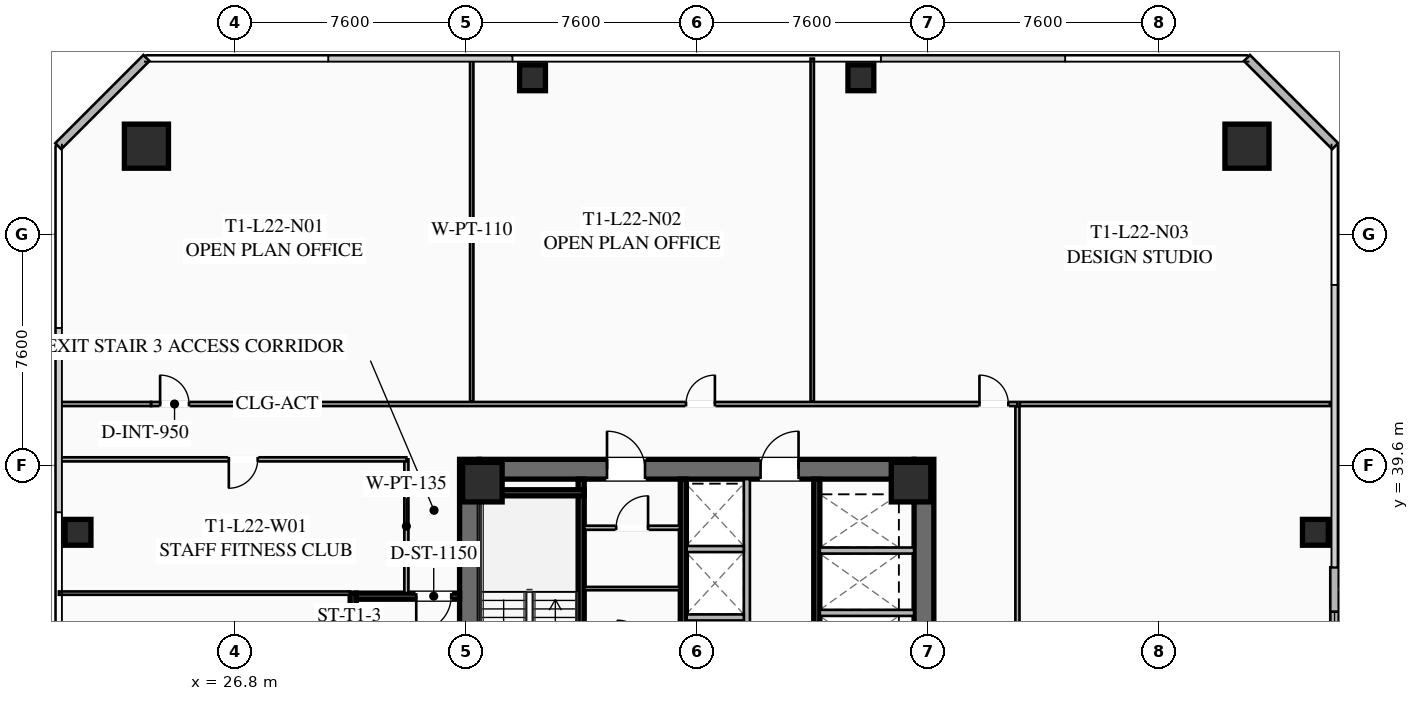
"""IFC4 building model, lengths in metres.
Left out: names, types, materials, properties, quantities, classifications, styles, units other than length and angle.
Written with IfcOpenShell. Run it as: python <this file> out.ifc"""

import sys

from ifc_helpers import new_model, si_unit, direction, frame, frame_2d, origin, origin_2d, place, context, subcontext, project, spatial, rectangle, hollow_rectangle, extrude, element, fill, save


model = new_model("IFC4")
c1 = context("Model", 3, precision=1e-05, world=origin(), true_north=direction((0.0, 1.0)))
c2 = subcontext(c1, "Body", "Model", "MODEL_VIEW")
j1 = project(units=[si_unit("LENGTHUNIT", "METRE"), si_unit("PLANEANGLEUNIT", "RADIAN")], contexts=[c1])
p1 = place(None, origin())
s1 = spatial("IfcSite", under=j1, at=p1, CompositionType="ELEMENT")
p2 = place(p1, origin())
s2 = spatial("IfcBuilding", under=s1, at=p2, CompositionType="ELEMENT")
p3 = place(p2, frame((0.0, 0.0, 84.95)))
s3 = spatial("IfcBuildingStorey", under=s2, at=p3, CompositionType="ELEMENT", Elevation=84.95)
for number, where, z_axis, x_axis in (
    (1, (34.525, 24.2, 0.0), (0.0, 0.0, 1.0), (0.0, 1.0, 0.0)),
    (2, (49.475, 39.8, 0.0), (0.0, 0.0, 1.0), (0.0, -1.0, 0.0)),
):
    element("IfcWall", number, at=place(p3, frame(where, z_axis=z_axis, x_axis=x_axis)), inside=s3, PredefinedType="SHEAR", context=c2, shape_type="SweptSolid", body=[
        extrude(rectangle(XDim=15.6, YDim=0.65, at=frame_2d((7.8, 0.0))), origin(), (0.0, 0.0, 1.0), 3.55),
    ])
p4 = place(p3, frame((34.85, 39.475, 0.0), z_axis=(0.0, 0.0, 1.0), x_axis=(1.0, 0.0, 0.0)))
e3 = element("IfcWall", 3, at=p4, inside=s3, PredefinedType="SHEAR", context=c2, shape_type="SweptSolid", body=[
    extrude(rectangle(XDim=14.3, YDim=0.65, at=frame_2d((7.15, 0.0))), origin(), (0.0, 0.0, 1.0), 3.55),
])
p5 = place(p4, frame((4.2, 0.0, 0.0)))
e4 = element("IfcOpeningElement", 4, at=p5, cuts=e3, PredefinedType="OPENING", context=c2, shape_type="SweptSolid", body=[
    extrude(rectangle(XDim=1.25, YDim=2.25, at=frame_2d((0.625, 1.125))), frame((0.0, 0.335, 0.0), z_axis=(0.0, -1.0, 0.0), x_axis=(1.0, 0.0, 0.0)), (0.0, 0.0, 1.0), 0.67),
])
p6 = place(p4, frame((9.25, 0.0, 0.0)))
e5 = element("IfcOpeningElement", 5, at=p6, cuts=e3, PredefinedType="OPENING", context=c2, shape_type="SweptSolid", body=[
    extrude(rectangle(XDim=1.25, YDim=2.25, at=frame_2d((0.625, 1.125))), frame((0.0, 0.335, 0.0), z_axis=(0.0, -1.0, 0.0), x_axis=(1.0, 0.0, 0.0)), (0.0, 0.0, 1.0), 0.67),
])
for number, where, z_axis, x_axis in (
    (6, (49.05, 39.05, 0.0), (0.0, 0.0, 1.0), (1.0, 0.0, 0.0)),
    (7, (34.95, 39.05, 0.0), (0.0, 0.0, 1.0), (1.0, 0.0, 0.0)),
):
    element("IfcColumn", number, at=place(p3, frame(where, z_axis=z_axis, x_axis=x_axis)), inside=s3, PredefinedType="COLUMN", context=c2, shape_type="SweptSolid", body=[
        extrude(hollow_rectangle(XDim=1.3, YDim=1.3, WallThickness=0.05, at=origin_2d()), origin(), (0.0, 0.0, 1.0), 3.35),
    ])
for number, where, z_axis, x_axis in (
    (8, (60.1, 50.1, 0.0), (0.0, 0.0, 1.0), (1.0, 0.0, 0.0)),
    (9, (23.9, 50.1, 0.0), (0.0, 0.0, 1.0), (1.0, 0.0, 0.0)),
):
    element("IfcColumn", number, at=place(p3, frame(where, z_axis=z_axis, x_axis=x_axis)), inside=s3, PredefinedType="COLUMN", context=c2, shape_type="SweptSolid", body=[
        extrude(hollow_rectangle(XDim=1.45, YDim=1.45, WallThickness=0.055, at=origin_2d()), origin(), (0.0, 0.0, 1.0), 3.35),
    ])
for number, where, z_axis, x_axis in (
    (10, (62.35, 37.4, 0.0), (0.0, 0.0, 1.0), (1.0, 0.0, 0.0)),
    (11, (47.4, 52.35, 0.0), (0.0, 0.0, 1.0), (1.0, 0.0, 0.0)),
    (12, (36.6, 52.35, 0.0), (0.0, 0.0, 1.0), (1.0, 0.0, 0.0)),
    (13, (21.65, 37.4, 0.0), (0.0, 0.0, 1.0), (1.0, 0.0, 0.0)),
):
    element("IfcColumn", number, at=place(p3, frame(where, z_axis=z_axis, x_axis=x_axis)), inside=s3, PredefinedType="COLUMN", context=c2, shape_type="SweptSolid", body=[
        extrude(hollow_rectangle(XDim=0.85, YDim=0.85, WallThickness=0.035, at=origin_2d()), origin(), (0.0, 0.0, 1.0), 3.35),
    ])
p7 = place(p3, frame((62.98, 36.25, 0.0), z_axis=(0.0, 0.0, 1.0), x_axis=(0.0, -1.0, 0.0)))
e14 = element("IfcWall", 14, at=p7, inside=s3, PredefinedType="SOLIDWALL", context=c2, shape_type="SweptSolid", body=[
    extrude(rectangle(XDim=8.5, YDim=0.28, at=frame_2d((4.25, 0.0))), origin(), (0.0, 0.0, 1.0), 3.35),
])
p8 = place(p7, frame((3.6, 0.0, 0.0)))
e15 = element("IfcOpeningElement", 15, at=p8, cuts=e14, PredefinedType="OPENING", context=c2, shape_type="SweptSolid", body=[
    extrude(rectangle(XDim=1.3, YDim=2.15, at=frame_2d((0.65, 1.075))), frame((0.0, 0.15, 0.0), z_axis=(0.0, -1.0, 0.0), x_axis=(1.0, 0.0, 0.0)), (0.0, 0.0, 1.0), 0.3),
])
p9 = place(p7, frame((1.46, 0.0, 0.85)))
e16 = element("IfcOpeningElement", 16, at=p9, cuts=e14, PredefinedType="OPENING", context=c2, shape_type="SweptSolid", body=[
    extrude(rectangle(XDim=1.8, YDim=1.92, at=frame_2d((0.9, 0.96))), frame((0.0, 0.15, 0.0), z_axis=(0.0, -1.0, 0.0), x_axis=(1.0, 0.0, 0.0)), (0.0, 0.0, 1.0), 0.3),
])
for number, where, z_axis, x_axis in (
    (17, (21.0, 50.1, 0.0), (0.0, 0.0, 1.0), (0.707, 0.707, 0.0)),
    (18, (60.1, 53.0, 0.0), (0.0, 0.0, 1.0), (0.707, -0.707, 0.0)),
):
    element("IfcWall", number, at=place(p3, frame(where, z_axis=z_axis, x_axis=x_axis)), inside=s3, PredefinedType="SOLIDWALL", context=c2, shape_type="SweptSolid", body=[
        extrude(rectangle(XDim=4.101, YDim=0.28, at=frame_2d((2.051, 0.0))), origin(), (0.0, 0.0, 1.0), 3.35),
    ])
p10 = place(p3, frame((38.2, 31.2, 0.0), z_axis=(0.0, 0.0, 1.0), x_axis=(0.0, 1.0, 0.0)))
e19 = element("IfcWall", 19, at=p10, inside=s3, PredefinedType="SHEAR", context=c2, shape_type="SweptSolid", body=[
    extrude(rectangle(XDim=7.95, YDim=0.2, at=frame_2d((3.975, 0.0))), origin(), (0.0, 0.0, 1.0), 3.35),
])
p11 = place(p10, frame((0.45, 0.0, 0.0)))
e20 = element("IfcOpeningElement", 20, at=p11, cuts=e19, PredefinedType="OPENING", context=c2, shape_type="SweptSolid", body=[
    extrude(rectangle(XDim=1.15, YDim=2.2, at=frame_2d((0.575, 1.1))), frame((0.0, 0.11, 0.0), z_axis=(0.0, -1.0, 0.0), x_axis=(1.0, 0.0, 0.0)), (0.0, 0.0, 1.0), 0.22),
])
p12 = place(p3, frame((34.85, 38.7, 0.0), z_axis=(0.0, 0.0, 1.0), x_axis=(1.0, 0.0, 0.0)))
e21 = element("IfcWall", 21, at=p12, inside=s3, PredefinedType="SHEAR", context=c2, shape_type="SweptSolid", body=[
    extrude(rectangle(XDim=3.45, YDim=0.2, at=frame_2d((1.725, 0.0))), origin(), (0.0, 0.0, 1.0), 3.35),
])
p13 = place(p3, frame((41.56, 24.85, 0.0), z_axis=(0.0, 0.0, 1.0), x_axis=(0.0, 1.0, 0.0)))
e22 = element("IfcWall", 22, at=p13, inside=s3, PredefinedType="SHEAR", context=c2, shape_type="SweptSolid", body=[
    extrude(rectangle(XDim=14.3, YDim=0.2, at=frame_2d((7.15, 0.0))), origin(), (0.0, 0.0, 1.0), 3.35),
])
p14 = place(p3, frame((45.95, 39.15, 0.0), z_axis=(0.0, 0.0, 1.0), x_axis=(0.0, -1.0, 0.0)))
e23 = element("IfcWall", 23, at=p14, inside=s3, PredefinedType="SHEAR", context=c2, shape_type="SweptSolid", body=[
    extrude(rectangle(XDim=6.35, YDim=0.2, at=frame_2d((3.175, 0.0))), origin(), (0.0, 0.0, 1.0), 3.35),
])
for number, where, z_axis, x_axis in (
    (24, (46.05, 34.75, 0.0), (0.0, 0.0, 1.0), (1.0, 0.0, 0.0)),
    (25, (46.05, 36.8, 0.0), (0.0, 0.0, 1.0), (1.0, 0.0, 0.0)),
):
    element("IfcWall", number, at=place(p3, frame(where, z_axis=z_axis, x_axis=x_axis)), inside=s3, PredefinedType="SOLIDWALL", context=c2, shape_type="SweptSolid", body=[
        extrude(rectangle(XDim=3.1, YDim=0.2, at=frame_2d((1.55, 0.0))), origin(), (0.0, 0.0, 1.0), 3.35),
    ])
p15 = place(p3, frame((38.3, 37.55, 0.0), z_axis=(0.0, 0.0, 1.0), x_axis=(1.0, 0.0, 0.0)))
e26 = element("IfcWall", 26, at=p15, inside=s3, PredefinedType="PARTITIONING", context=c2, shape_type="SweptSolid", body=[
    extrude(rectangle(XDim=3.15, YDim=0.135, at=frame_2d((1.575, 0.0))), origin(), (0.0, 0.0, 1.0), 2.703),
])
p16 = place(p15, frame((1.05, 0.0, 0.0)))
e27 = element("IfcOpeningElement", 27, at=p16, cuts=e26, PredefinedType="OPENING", context=c2, shape_type="SweptSolid", body=[
    extrude(rectangle(XDim=1.05, YDim=2.2, at=frame_2d((0.525, 1.1))), frame((0.0, 0.077, 0.0), z_axis=(0.0, -1.0, 0.0), x_axis=(1.0, 0.0, 0.0)), (0.0, 0.0, 1.0), 0.155),
])
p17 = place(p3, frame((38.3, 35.55, 0.0), z_axis=(0.0, 0.0, 1.0), x_axis=(1.0, 0.0, 0.0)))
e28 = element("IfcWall", 28, at=p17, inside=s3, PredefinedType="PARTITIONING", context=c2, shape_type="SweptSolid", body=[
    extrude(rectangle(XDim=3.15, YDim=0.11, at=frame_2d((1.575, 0.0))), origin(), (0.0, 0.0, 1.0), 2.703),
])
p18 = place(p3, frame((43.65, 32.35, 0.0), z_axis=(0.0, 0.0, 1.0), x_axis=(0.0, 1.0, 0.0)))
e29 = element("IfcWall", 29, at=p18, inside=s3, PredefinedType="SOLIDWALL", context=c2, shape_type="SweptSolid", body=[
    extrude(rectangle(XDim=6.8, YDim=0.2, at=frame_2d((3.4, 0.0))), origin(), (0.0, 0.0, 1.0), 3.35),
])
for number, where, z_axis, x_axis in (
    (30, (41.67, 34.6, 0.0), (0.0, 0.0, 1.0), (1.0, 0.0, 0.0)),
    (31, (41.67, 36.85, 0.0), (0.0, 0.0, 1.0), (1.0, 0.0, 0.0)),
):
    element("IfcWall", number, at=place(p3, frame(where, z_axis=z_axis, x_axis=x_axis)), inside=s3, PredefinedType="SOLIDWALL", context=c2, shape_type="SweptSolid", body=[
        extrude(rectangle(XDim=1.88, YDim=0.2, at=frame_2d((0.94, 0.0))), origin(), (0.0, 0.0, 1.0), 3.35),
    ])
p19 = place(p3, frame((30.7, 28.6, 0.0), z_axis=(0.0, 0.0, 1.0), x_axis=(0.0, 1.0, 0.0)))
e32 = element("IfcWall", 32, at=p19, inside=s3, PredefinedType="SHEAR", context=c2, shape_type="SweptSolid", body=[
    extrude(rectangle(XDim=6.8, YDim=0.2, at=frame_2d((3.4, 0.0))), origin(), (0.0, 0.0, 1.0), 3.35),
])
p20 = place(p3, frame((34.2, 35.3, 0.0), z_axis=(0.0, 0.0, 1.0), x_axis=(-1.0, 0.0, 0.0)))
e33 = element("IfcWall", 33, at=p20, inside=s3, PredefinedType="SHEAR", context=c2, shape_type="SweptSolid", body=[
    extrude(rectangle(XDim=3.4, YDim=0.2, at=frame_2d((1.7, 0.0))), origin(), (0.0, 0.0, 1.0), 3.35),
])
p21 = place(p20, frame((0.275, 0.0, 0.0)))
e34 = element("IfcOpeningElement", 34, at=p21, cuts=e33, PredefinedType="OPENING", context=c2, shape_type="SweptSolid", body=[
    extrude(rectangle(XDim=1.15, YDim=2.2, at=frame_2d((0.575, 1.1))), frame((0.0, 0.11, 0.0), z_axis=(0.0, -1.0, 0.0), x_axis=(1.0, 0.0, 0.0)), (0.0, 0.0, 1.0), 0.22),
])
p22 = place(p3, frame((32.45, 35.4, 0.0), z_axis=(0.0, 0.0, 1.0), x_axis=(0.0, 1.0, 0.0)))
e35 = element("IfcWall", 35, at=p22, inside=s3, PredefinedType="PARTITIONING", context=c2, shape_type="SweptSolid", body=[
    extrude(rectangle(XDim=4.4, YDim=0.135, at=frame_2d((2.2, 0.0))), origin(), (0.0, 0.0, 1.0), 2.703),
])
p23 = place(p3, frame((24.05, 41.62, 0.0), z_axis=(0.0, 0.0, 1.0), x_axis=(1.0, 0.0, 0.0)))
e36 = element("IfcWall", 36, at=p23, inside=s3, PredefinedType="PARTITIONING", context=c2, shape_type="SweptSolid", body=[
    extrude(rectangle(XDim=28.5, YDim=0.135, at=frame_2d((14.25, 0.0))), origin(), (0.0, 0.0, 1.0), 2.703),
])
p24 = place(p23, frame((0.3, 0.0, 0.0)))
e37 = element("IfcOpeningElement", 37, at=p24, cuts=e36, PredefinedType="OPENING", context=c2, shape_type="SweptSolid", body=[
    extrude(rectangle(XDim=0.95, YDim=2.05, at=frame_2d((0.475, 1.025))), frame((0.0, 0.077, 0.0), z_axis=(0.0, -1.0, 0.0), x_axis=(1.0, 0.0, 0.0)), (0.0, 0.0, 1.0), 0.155),
])
p25 = place(p23, frame((17.599, 0.0, 0.0)))
e38 = element("IfcOpeningElement", 38, at=p25, cuts=e36, PredefinedType="OPENING", context=c2, shape_type="SweptSolid", body=[
    extrude(rectangle(XDim=0.95, YDim=2.05, at=frame_2d((0.475, 1.025))), frame((0.0, 0.077, 0.0), z_axis=(0.0, -1.0, 0.0), x_axis=(1.0, 0.0, 0.0)), (0.0, 0.0, 1.0), 0.155),
])
p26 = place(p23, frame((27.25, 0.0, 0.0)))
e39 = element("IfcOpeningElement", 39, at=p26, cuts=e36, PredefinedType="OPENING", context=c2, shape_type="SweptSolid", body=[
    extrude(rectangle(XDim=0.95, YDim=2.05, at=frame_2d((0.475, 1.025))), frame((0.0, 0.077, 0.0), z_axis=(0.0, -1.0, 0.0), x_axis=(1.0, 0.0, 0.0)), (0.0, 0.0, 1.0), 0.155),
])
p27 = place(p3, frame((21.02, 41.62, 0.0), z_axis=(0.0, 0.0, 1.0), x_axis=(1.0, 0.0, 0.0)))
e40 = element("IfcWall", 40, at=p27, inside=s3, PredefinedType="PARTITIONING", context=c2, shape_type="SweptSolid", body=[
    extrude(rectangle(XDim=3.03, YDim=0.135, at=frame_2d((1.515, 0.0))), origin(), (0.0, 0.0, 1.0), 2.703),
])
for number, where, z_axis, x_axis in (
    (41, (34.6, 41.7, 0.0), (0.0, 0.0, 1.0), (0.0, 1.0, 0.0)),
    (42, (45.8, 41.7, 0.0), (0.0, 0.0, 1.0), (0.0, 1.0, 0.0)),
):
    element("IfcWall", number, at=place(p3, frame(where, z_axis=z_axis, x_axis=x_axis)), inside=s3, PredefinedType="PARTITIONING", context=c2, shape_type="SweptSolid", body=[
        extrude(rectangle(XDim=11.28, YDim=0.11, at=frame_2d((5.64, 0.0))), origin(), (0.0, 0.0, 1.0), 2.703),
    ])
p28 = place(p3, frame((52.55, 41.54, 0.0), z_axis=(0.0, 0.0, 1.0), x_axis=(0.0, -1.0, 0.0)))
e43 = element("IfcWall", 43, at=p28, inside=s3, PredefinedType="PARTITIONING", context=c2, shape_type="SweptSolid", body=[
    extrude(rectangle(XDim=20.71, YDim=0.135, at=frame_2d((10.355, 0.0))), origin(), (0.0, 0.0, 1.0), 2.703),
])
p29 = place(p28, frame((19.46, 0.0, 0.0)))
e44 = element("IfcOpeningElement", 44, at=p29, cuts=e43, PredefinedType="OPENING", context=c2, shape_type="SweptSolid", body=[
    extrude(rectangle(XDim=0.95, YDim=2.05, at=frame_2d((0.475, 1.025))), frame((0.0, 0.077, 0.0), z_axis=(0.0, -1.0, 0.0), x_axis=(1.0, 0.0, 0.0)), (0.0, 0.0, 1.0), 0.155),
])
p30 = place(p3, frame((62.83, 41.62, 0.0), z_axis=(0.0, 0.0, 1.0), x_axis=(-1.0, 0.0, 0.0)))
e45 = element("IfcWall", 45, at=p30, inside=s3, PredefinedType="PARTITIONING", context=c2, shape_type="SweptSolid", body=[
    extrude(rectangle(XDim=10.2, YDim=0.135, at=frame_2d((5.1, 0.0))), origin(), (0.0, 0.0, 1.0), 2.703),
])
p31 = place(p3, frame((32.45, 39.8, 0.0), z_axis=(0.0, 0.0, 1.0), x_axis=(-1.0, 0.0, 0.0)))
e46 = element("IfcWall", 46, at=p31, inside=s3, PredefinedType="PARTITIONING", context=c2, shape_type="SweptSolid", body=[
    extrude(rectangle(XDim=11.43, YDim=0.135, at=frame_2d((5.715, 0.0))), origin(), (0.0, 0.0, 1.0), 2.703),
])
p32 = place(p31, frame((4.89, 0.0, 0.0)))
e47 = element("IfcOpeningElement", 47, at=p32, cuts=e46, PredefinedType="OPENING", context=c2, shape_type="SweptSolid", body=[
    extrude(rectangle(XDim=0.95, YDim=2.05, at=frame_2d((0.475, 1.025))), frame((0.0, 0.077, 0.0), z_axis=(0.0, -1.0, 0.0), x_axis=(1.0, 0.0, 0.0)), (0.0, 0.0, 1.0), 0.155),
])
p33 = place(p3, frame((30.6, 35.4, 0.0), z_axis=(0.0, 0.0, 1.0), x_axis=(-1.0, 0.0, 0.0)))
e48 = element("IfcWall", 48, at=p33, inside=s3, PredefinedType="PARTITIONING", context=c2, shape_type="SweptSolid", body=[
    extrude(rectangle(XDim=9.58, YDim=0.11, at=frame_2d((4.79, 0.0))), origin(), (0.0, 0.0, 1.0), 2.703),
])
p34 = place(p9, origin())
e49 = element("IfcWindow", 49, at=p34, inside=s3, PartitioningType="SINGLE_PANEL", PredefinedType="WINDOW", context=c2, shape_type="SweptSolid", body=[
    extrude(rectangle(XDim=1.8, YDim=1.92, at=frame_2d((0.9, 0.96))), frame((0.0, 0.03, 0.0), z_axis=(0.0, -1.0, 0.0), x_axis=(1.0, 0.0, 0.0)), (0.0, 0.0, 1.0), 0.06),
])
fill(e16, e49)
p35 = place(p5, origin())
e50 = element("IfcDoor", 50, at=p35, inside=s3, OperationType="SINGLE_SWING_LEFT", PredefinedType="DOOR", context=c2, shape_type="SweptSolid", body=[
    extrude(rectangle(XDim=1.25, YDim=2.25, at=frame_2d((0.625, 1.125))), frame((0.0, 0.025, 0.0), z_axis=(0.0, -1.0, 0.0), x_axis=(1.0, 0.0, 0.0)), (0.0, 0.0, 1.0), 0.05),
])
fill(e4, e50)
p36 = place(p6, origin())
e51 = element("IfcDoor", 51, at=p36, inside=s3, OperationType="SINGLE_SWING_RIGHT", PredefinedType="DOOR", context=c2, shape_type="SweptSolid", body=[
    extrude(rectangle(XDim=1.25, YDim=2.25, at=frame_2d((0.625, 1.125))), frame((0.0, 0.025, 0.0), z_axis=(0.0, -1.0, 0.0), x_axis=(1.0, 0.0, 0.0)), (0.0, 0.0, 1.0), 0.05),
])
fill(e5, e51)
p37 = place(p16, origin())
e52 = element("IfcDoor", 52, at=p37, inside=s3, OperationType="SINGLE_SWING_RIGHT", PredefinedType="DOOR", context=c2, shape_type="SweptSolid", body=[
    extrude(rectangle(XDim=1.05, YDim=2.2, at=frame_2d((0.525, 1.1))), frame((0.0, 0.025, 0.0), z_axis=(0.0, -1.0, 0.0), x_axis=(1.0, 0.0, 0.0)), (0.0, 0.0, 1.0), 0.05),
])
fill(e27, e52)
p38 = place(p21, origin())
e53 = element("IfcDoor", 53, at=p38, inside=s3, OperationType="SINGLE_SWING_RIGHT", PredefinedType="DOOR", context=c2, shape_type="SweptSolid", body=[
    extrude(rectangle(XDim=1.15, YDim=2.2, at=frame_2d((0.575, 1.1))), frame((0.0, 0.025, 0.0), z_axis=(0.0, -1.0, 0.0), x_axis=(1.0, 0.0, 0.0)), (0.0, 0.0, 1.0), 0.05),
])
fill(e34, e53)
p39 = place(p24, origin())
e54 = element("IfcDoor", 54, at=p39, inside=s3, OperationType="SINGLE_SWING_LEFT", PredefinedType="DOOR", context=c2, shape_type="SweptSolid", body=[
    extrude(rectangle(XDim=0.95, YDim=2.05, at=frame_2d((0.475, 1.025))), frame((0.0, 0.025, 0.0), z_axis=(0.0, -1.0, 0.0), x_axis=(1.0, 0.0, 0.0)), (0.0, 0.0, 1.0), 0.05),
])
fill(e37, e54)
p40 = place(p25, origin())
e55 = element("IfcDoor", 55, at=p40, inside=s3, OperationType="SINGLE_SWING_RIGHT", PredefinedType="DOOR", context=c2, shape_type="SweptSolid", body=[
    extrude(rectangle(XDim=0.95, YDim=2.05, at=frame_2d((0.475, 1.025))), frame((0.0, 0.025, 0.0), z_axis=(0.0, -1.0, 0.0), x_axis=(1.0, 0.0, 0.0)), (0.0, 0.0, 1.0), 0.05),
])
fill(e38, e55)
p41 = place(p26, origin())
e56 = element("IfcDoor", 56, at=p41, inside=s3, OperationType="SINGLE_SWING_LEFT", PredefinedType="DOOR", context=c2, shape_type="SweptSolid", body=[
    extrude(rectangle(XDim=0.95, YDim=2.05, at=frame_2d((0.475, 1.025))), frame((0.0, 0.025, 0.0), z_axis=(0.0, -1.0, 0.0), x_axis=(1.0, 0.0, 0.0)), (0.0, 0.0, 1.0), 0.05),
])
fill(e39, e56)
p42 = place(p32, origin())
e57 = element("IfcDoor", 57, at=p42, inside=s3, OperationType="SINGLE_SWING_RIGHT", PredefinedType="DOOR", context=c2, shape_type="SweptSolid", body=[
    extrude(rectangle(XDim=0.95, YDim=2.05, at=frame_2d((0.475, 1.025))), frame((0.0, 0.025, 0.0), z_axis=(0.0, -1.0, 0.0), x_axis=(1.0, 0.0, 0.0)), (0.0, 0.0, 1.0), 0.05),
])
fill(e47, e57)
save(model, sys.argv[1])
